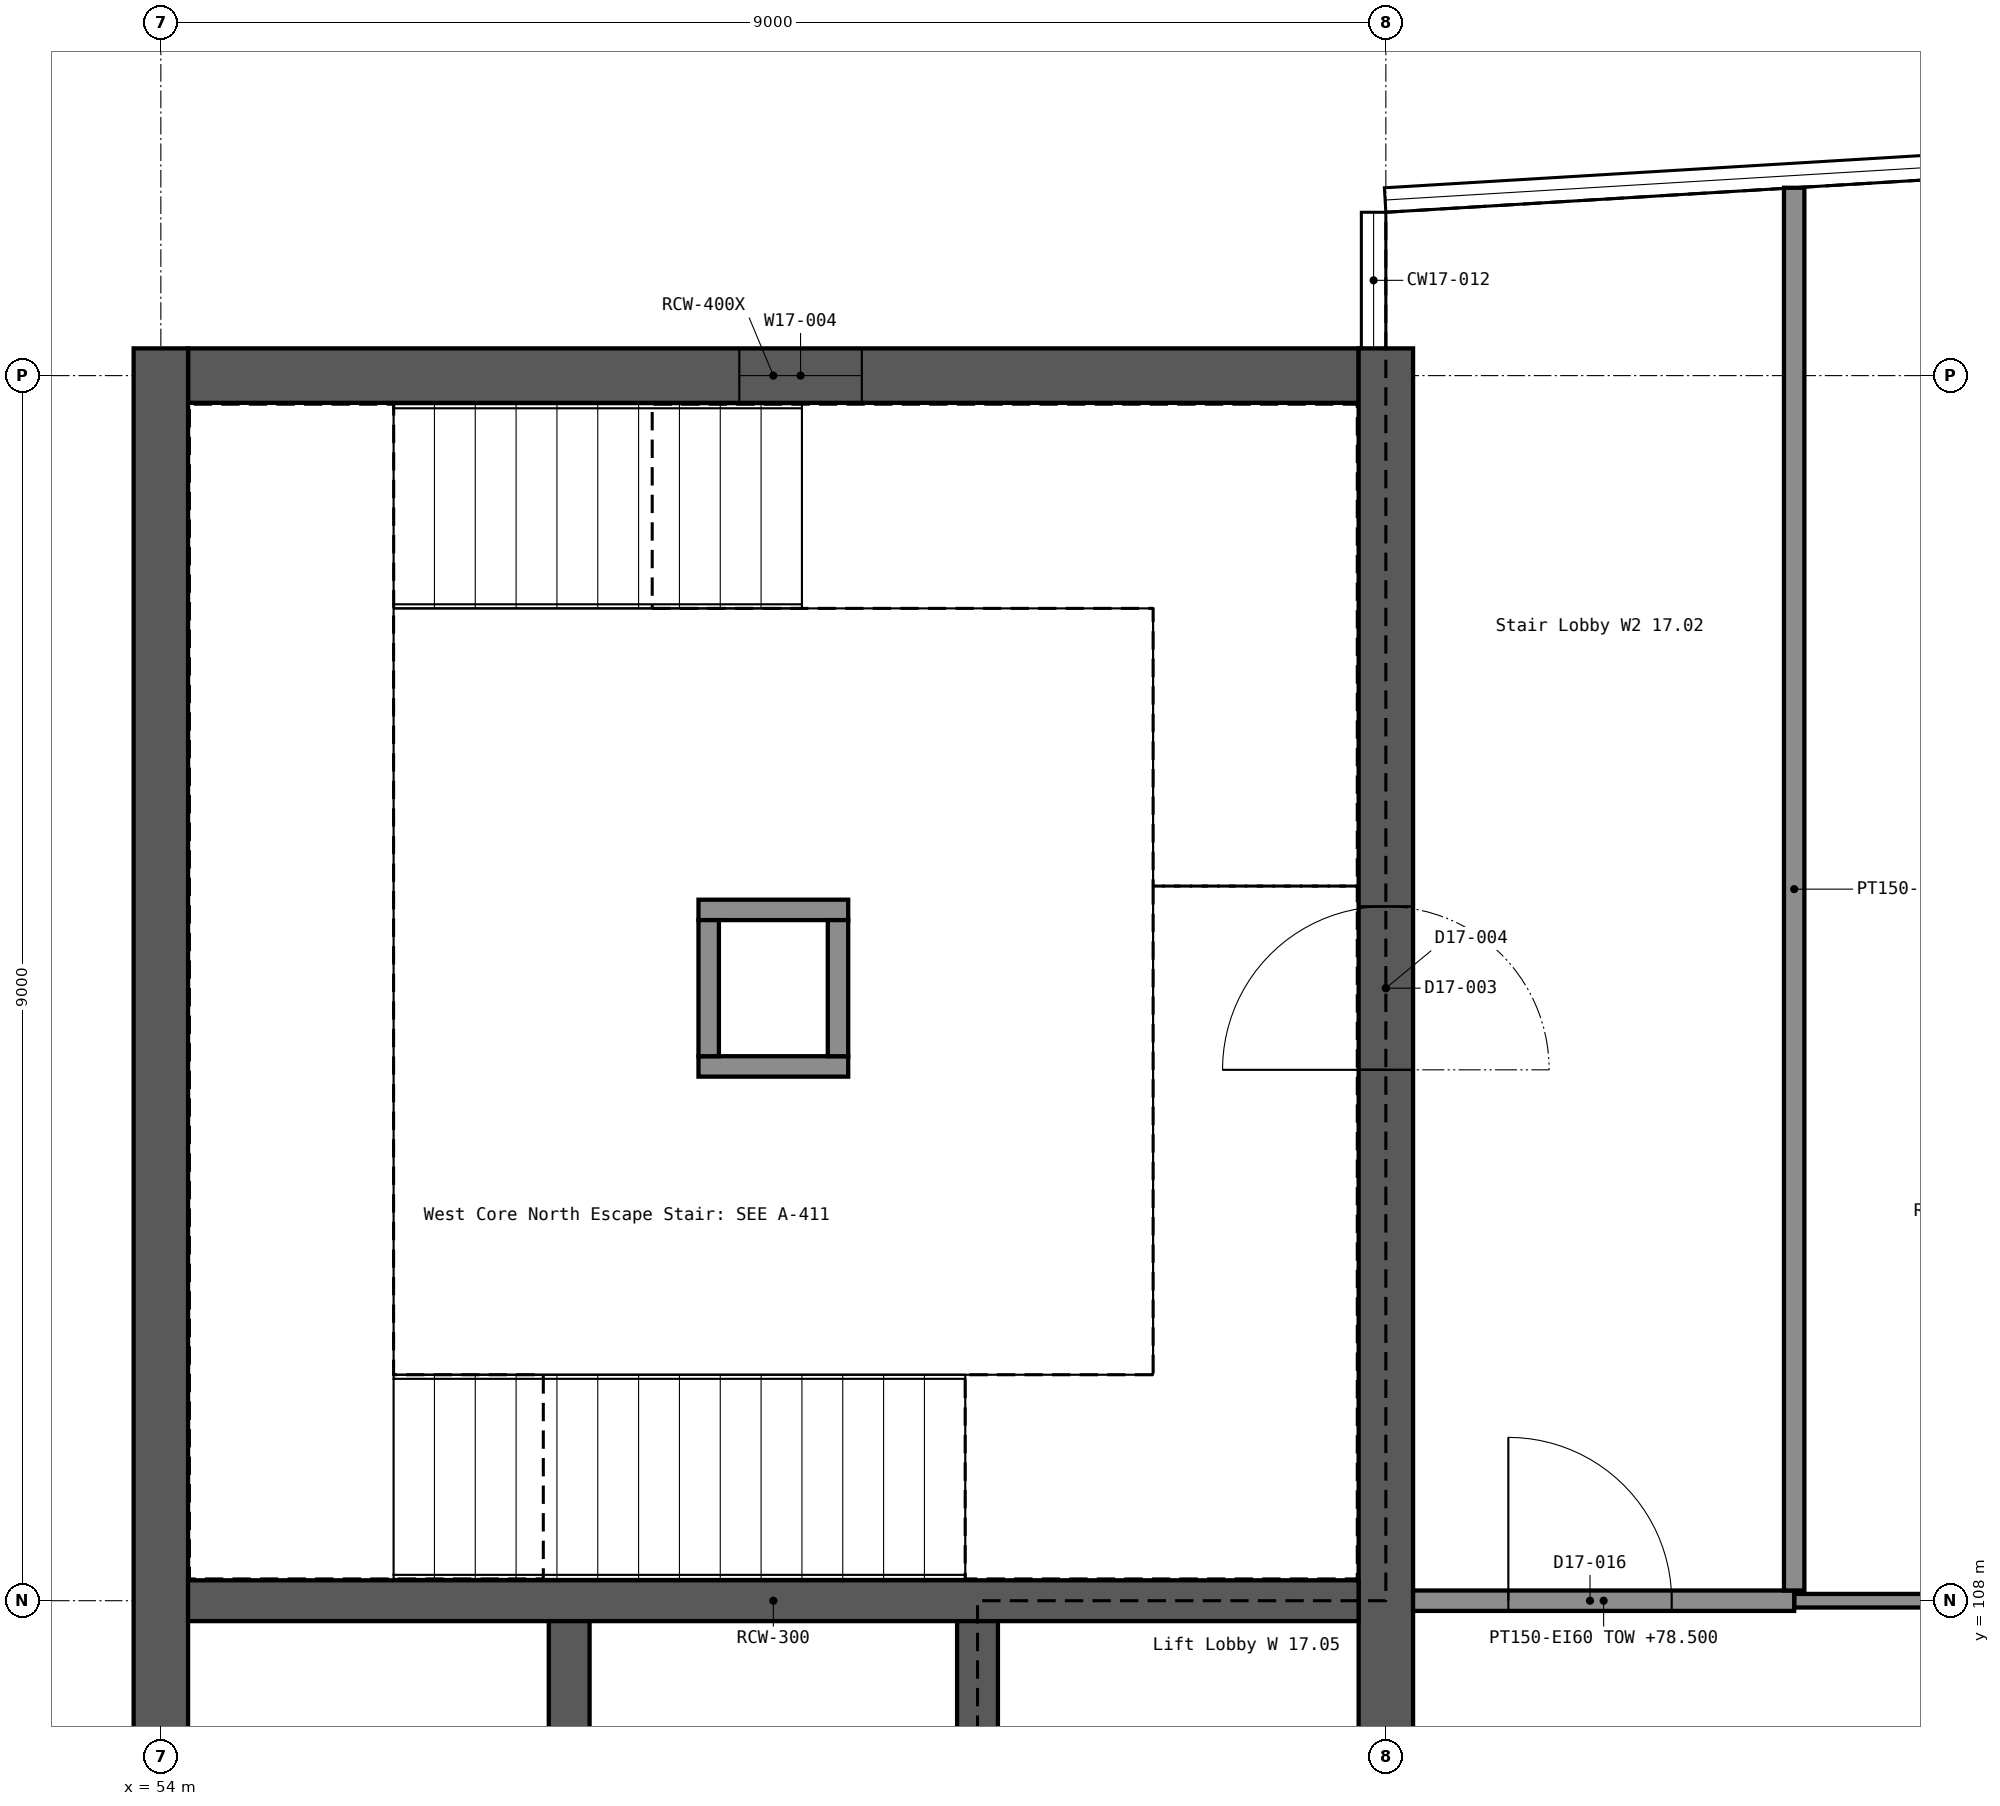
"""IFC4 building model, lengths in metres.
Left out: names, types, materials, properties, quantities, classifications, styles, units other than length and angle.
Written with IfcOpenShell. Run it as: python <this file> out.ifc"""

import sys

from ifc_helpers import new_model, si_unit, direction, frame, frame_2d, origin, origin_2d, place, context, subcontext, project, spatial, rectangle, extrude, element, fill, save


model = new_model("IFC4")
c1 = context("Model", 3, precision=1e-05, world=origin(), true_north=direction((0.0, 1.0)))
c2 = subcontext(c1, "Body", "Model", "MODEL_VIEW")
j1 = project(units=[si_unit("LENGTHUNIT", "METRE"), si_unit("PLANEANGLEUNIT", "RADIAN")], contexts=[c1])
p1 = place(None, origin())
s1 = spatial("IfcSite", under=j1, at=p1, CompositionType="ELEMENT")
p2 = place(p1, origin())
s2 = spatial("IfcBuilding", under=s1, at=p2, CompositionType="ELEMENT")
p3 = place(p2, frame((0.0, 0.0, 75.3)))
s3 = spatial("IfcBuildingStorey", under=s2, at=p3, CompositionType="ELEMENT", Elevation=75.3)
p4 = place(p3, frame((54.2, 117.0, 0.0), z_axis=(0.0, 0.0, 1.0), x_axis=(1.0, 0.0, 0.0)))
e1 = element("IfcWall", 1, at=p4, inside=s3, PredefinedType="SHEAR", context=c2, shape_type="SweptSolid", body=[
    extrude(rectangle(XDim=8.6, YDim=0.4, at=frame_2d((4.3, 0.0))), origin(), (0.0, 0.0, 1.0), 7.5),
])
p5 = place(p4, frame((4.05, 0.0, 1.2)))
e2 = element("IfcOpeningElement", 2, at=p5, cuts=e1, PredefinedType="OPENING", context=c2, shape_type="SweptSolid", body=[
    extrude(rectangle(XDim=0.9, YDim=1.5, at=frame_2d((0.45, 0.75))), frame((0.0, 0.211, 0.0), z_axis=(0.0, -1.0, 0.0), x_axis=(1.0, 0.0, 0.0)), (0.0, 0.0, 1.0), 0.422),
])
p6 = place(p3, frame((54.0, 89.8, 0.0), z_axis=(0.0, 0.0, 1.0), x_axis=(0.0, 1.0, 0.0)))
e3 = element("IfcWall", 3, at=p6, inside=s3, PredefinedType="SHEAR", context=c2, shape_type="SweptSolid", body=[
    extrude(rectangle(XDim=27.4, YDim=0.4, at=frame_2d((13.7, 0.0))), origin(), (0.0, 0.0, 1.0), 7.5),
])
p7 = place(p3, frame((63.0, 89.8, 0.0), z_axis=(0.0, 0.0, 1.0), x_axis=(0.0, 1.0, 0.0)))
e4 = element("IfcWall", 4, at=p7, inside=s3, PredefinedType="SHEAR", context=c2, shape_type="SweptSolid", body=[
    extrude(rectangle(XDim=27.4, YDim=0.4, at=frame_2d((13.7, 0.0))), origin(), (0.0, 0.0, 1.0), 7.5),
])
p8 = place(p7, frame((4.1, 0.0, 0.0)))
e5 = element("IfcOpeningElement", 5, at=p8, cuts=e4, PredefinedType="OPENING", context=c2, shape_type="SweptSolid", body=[
    extrude(rectangle(XDim=1.2, YDim=2.1, at=frame_2d((0.6, 1.05))), frame((0.0, 0.211, 0.0), z_axis=(0.0, -1.0, 0.0), x_axis=(1.0, 0.0, 0.0)), (0.0, 0.0, 1.0), 0.422),
])
p9 = place(p7, frame((4.1, 0.0, 3.9)))
e6 = element("IfcOpeningElement", 6, at=p9, cuts=e4, PredefinedType="OPENING", context=c2, shape_type="SweptSolid", body=[
    extrude(rectangle(XDim=1.2, YDim=2.1, at=frame_2d((0.6, 1.05))), frame((0.0, 0.211, 0.0), z_axis=(0.0, -1.0, 0.0), x_axis=(1.0, 0.0, 0.0)), (0.0, 0.0, 1.0), 0.422),
])
p10 = place(p7, frame((22.1, 0.0, 0.0)))
e7 = element("IfcOpeningElement", 7, at=p10, cuts=e4, PredefinedType="OPENING", context=c2, shape_type="SweptSolid", body=[
    extrude(rectangle(XDim=1.2, YDim=2.1, at=frame_2d((0.6, 1.05))), frame((0.0, 0.211, 0.0), z_axis=(0.0, -1.0, 0.0), x_axis=(1.0, 0.0, 0.0)), (0.0, 0.0, 1.0), 0.422),
])
p11 = place(p7, frame((22.1, 0.0, 3.9)))
e8 = element("IfcOpeningElement", 8, at=p11, cuts=e4, PredefinedType="OPENING", context=c2, shape_type="SweptSolid", body=[
    extrude(rectangle(XDim=1.2, YDim=2.1, at=frame_2d((0.6, 1.05))), frame((0.0, 0.211, 0.0), z_axis=(0.0, -1.0, 0.0), x_axis=(1.0, 0.0, 0.0)), (0.0, 0.0, 1.0), 0.422),
])
p12 = place(p7, frame((12.5, 0.0, 0.0)))
e9 = element("IfcOpeningElement", 9, at=p12, cuts=e4, PredefinedType="OPENING", context=c2, shape_type="SweptSolid", body=[
    extrude(rectangle(XDim=2.0, YDim=2.1, at=frame_2d((1.0, 1.05))), frame((0.0, 0.211, 0.0), z_axis=(0.0, -1.0, 0.0), x_axis=(1.0, 0.0, 0.0)), (0.0, 0.0, 1.0), 0.422),
])
p13 = place(p3, frame((54.2, 108.0, 0.0), z_axis=(0.0, 0.0, 1.0), x_axis=(1.0, 0.0, 0.0)))
e10 = element("IfcWall", 10, at=p13, inside=s3, PredefinedType="SHEAR", context=c2, shape_type="SweptSolid", body=[
    extrude(rectangle(XDim=8.6, YDim=0.3, at=frame_2d((4.3, 0.0))), origin(), (0.0, 0.0, 1.0), 7.5),
])
p14 = place(p3, frame((57.0, 99.15, 0.0), z_axis=(0.0, 0.0, 1.0), x_axis=(0.0, 1.0, 0.0)))
e11 = element("IfcWall", 11, at=p14, inside=s3, PredefinedType="SHEAR", context=c2, shape_type="SweptSolid", body=[
    extrude(rectangle(XDim=8.7, YDim=0.3, at=frame_2d((4.35, 0.0))), origin(), (0.0, 0.0, 1.0), 7.5),
])
p15 = place(p3, frame((60.0, 99.15, 0.0), z_axis=(0.0, 0.0, 1.0), x_axis=(0.0, 1.0, 0.0)))
e12 = element("IfcWall", 12, at=p15, inside=s3, PredefinedType="SHEAR", context=c2, shape_type="SweptSolid", body=[
    extrude(rectangle(XDim=8.7, YDim=0.3, at=frame_2d((4.35, 0.0))), origin(), (0.0, 0.0, 1.0), 7.5),
])
p16 = place(p15, frame((0.8, 0.0, 0.0)))
e13 = element("IfcOpeningElement", 13, at=p16, cuts=e12, PredefinedType="OPENING", context=c2, shape_type="SweptSolid", body=[
    extrude(rectangle(XDim=1.1, YDim=2.1, at=frame_2d((0.55, 1.05))), frame((0.0, 0.161, 0.0), z_axis=(0.0, -1.0, 0.0), x_axis=(1.0, 0.0, 0.0)), (0.0, 0.0, 1.0), 0.322),
])
p17 = place(p15, frame((3.8, 0.0, 0.0)))
e14 = element("IfcOpeningElement", 14, at=p17, cuts=e12, PredefinedType="OPENING", context=c2, shape_type="SweptSolid", body=[
    extrude(rectangle(XDim=1.1, YDim=2.1, at=frame_2d((0.55, 1.05))), frame((0.0, 0.161, 0.0), z_axis=(0.0, -1.0, 0.0), x_axis=(1.0, 0.0, 0.0)), (0.0, 0.0, 1.0), 0.322),
])
p18 = place(p15, frame((6.8, 0.0, 0.0)))
e15 = element("IfcOpeningElement", 15, at=p18, cuts=e12, PredefinedType="OPENING", context=c2, shape_type="SweptSolid", body=[
    extrude(rectangle(XDim=1.1, YDim=2.1, at=frame_2d((0.55, 1.05))), frame((0.0, 0.161, 0.0), z_axis=(0.0, -1.0, 0.0), x_axis=(1.0, 0.0, 0.0)), (0.0, 0.0, 1.0), 0.322),
])
p19 = place(p3, frame((68.997, 118.435, 3.9), z_axis=(0.0, 0.0, 1.0), x_axis=(-0.998203971819, -0.059906849736, 0.0)))
e16 = element("IfcWall", 16, at=p19, inside=s3, PredefinedType="PARAPET", context=c2, shape_type="SweptSolid", body=[
    extrude(rectangle(XDim=3.008, YDim=0.25, at=frame_2d((1.504, 0.0))), origin(), (0.0, 0.0, 1.0), 3.1),
])
p20 = place(p3, frame((65.995, 118.254, 3.9), z_axis=(0.0, 0.0, 1.0), x_axis=(-0.998208822746, -0.059825965875, 0.0)))
e17 = element("IfcWall", 17, at=p20, inside=s3, PredefinedType="PARAPET", context=c2, shape_type="SweptSolid", body=[
    extrude(rectangle(XDim=3.008, YDim=0.25, at=frame_2d((1.504, 0.0))), origin(), (0.0, 0.0, 1.0), 2.6),
])
p21 = place(p3, frame((63.125, 117.957, 3.9), z_axis=(0.0, 0.0, 1.0), x_axis=(0.0, -1.0, 0.0)))
e18 = element("IfcWall", 18, at=p21, inside=s3, PredefinedType="PARAPET", context=c2, shape_type="SweptSolid", body=[
    extrude(rectangle(XDim=0.757, YDim=0.25, at=frame_2d((0.379, 0.0))), origin(), (0.0, 0.0, 1.0), 1.1),
])
p22 = place(p3, frame((54.0, 89.85, 7.5), z_axis=(0.0, 0.0, 1.0), x_axis=(0.0, 1.0, 0.0)))
e19 = element("IfcWall", 19, at=p22, inside=s3, PredefinedType="PARAPET", context=c2, shape_type="SweptSolid", body=[
    extrude(rectangle(XDim=27.3, YDim=0.3, at=frame_2d((13.65, 0.0))), origin(), (0.0, 0.0, 1.0), 1.1),
])
p23 = place(p3, frame((63.0, 100.1, 7.5), z_axis=(0.0, 0.0, 1.0), x_axis=(0.0, 1.0, 0.0)))
e20 = element("IfcWall", 20, at=p23, inside=s3, PredefinedType="PARAPET", context=c2, shape_type="SweptSolid", body=[
    extrude(rectangle(XDim=17.05, YDim=0.3, at=frame_2d((8.525, 0.0))), origin(), (0.0, 0.0, 1.0), 1.1),
])
p24 = place(p3, frame((54.15, 117.0, 7.5), z_axis=(0.0, 0.0, 1.0), x_axis=(1.0, 0.0, 0.0)))
e21 = element("IfcWall", 21, at=p24, inside=s3, PredefinedType="PARAPET", context=c2, shape_type="SweptSolid", body=[
    extrude(rectangle(XDim=8.7, YDim=0.3, at=frame_2d((4.35, 0.0))), origin(), (0.0, 0.0, 1.0), 1.1),
])
for number, where, z_axis, x_axis in (
    (22, (57.95, 111.925, 7.5), (0.0, 0.0, 1.0), (1.0, 0.0, 0.0)),
    (23, (57.95, 113.075, 7.5), (0.0, 0.0, 1.0), (1.0, 0.0, 0.0)),
):
    element("IfcWall", number, at=place(p3, frame(where, z_axis=z_axis, x_axis=x_axis)), inside=s3, PredefinedType="SOLIDWALL", context=c2, shape_type="SweptSolid", body=[
        extrude(rectangle(XDim=1.1, YDim=0.15, at=frame_2d((0.55, 0.0))), origin(), (0.0, 0.0, 1.0), 0.15),
    ])
for number, where, z_axis, x_axis in (
    (24, (58.025, 112.0, 7.5), (0.0, 0.0, 1.0), (0.0, 1.0, 0.0)),
    (25, (58.975, 112.0, 7.5), (0.0, 0.0, 1.0), (0.0, 1.0, 0.0)),
):
    element("IfcWall", number, at=place(p3, frame(where, z_axis=z_axis, x_axis=x_axis)), inside=s3, PredefinedType="SOLIDWALL", context=c2, shape_type="SweptSolid", body=[
        extrude(rectangle(XDim=1.0, YDim=0.15, at=frame_2d((0.5, 0.0))), origin(), (0.0, 0.0, 1.0), 0.15),
    ])
p25 = place(p3, frame((66.0, 108.0, 0.0), z_axis=(0.0, 0.0, 1.0), x_axis=(1.0, 0.0, 0.0)))
e26 = element("IfcWall", 26, at=p25, inside=s3, PredefinedType="PARTITIONING", context=c2, shape_type="SweptSolid", body=[
    extrude(rectangle(XDim=5.87, YDim=0.1, at=frame_2d((2.935, 0.0))), origin(), (0.0, 0.0, 1.0), 3.2),
])
p26 = place(p25, frame((1.05, 0.0, 0.0)))
e27 = element("IfcOpeningElement", 27, at=p26, cuts=e26, PredefinedType="OPENING", context=c2, shape_type="SweptSolid", body=[
    extrude(rectangle(XDim=0.9, YDim=2.1, at=frame_2d((0.45, 1.05))), frame((0.0, 0.061, 0.0), z_axis=(0.0, -1.0, 0.0), x_axis=(1.0, 0.0, 0.0)), (0.0, 0.0, 1.0), 0.122),
])
p27 = place(p25, frame((4.1, 0.0, 0.0)))
e28 = element("IfcOpeningElement", 28, at=p27, cuts=e26, PredefinedType="OPENING", context=c2, shape_type="SweptSolid", body=[
    extrude(rectangle(XDim=0.8, YDim=2.1, at=frame_2d((0.4, 1.05))), frame((0.0, 0.061, 0.0), z_axis=(0.0, -1.0, 0.0), x_axis=(1.0, 0.0, 0.0)), (0.0, 0.0, 1.0), 0.122),
])
p28 = place(p3, frame((63.2, 108.0, 0.0), z_axis=(0.0, 0.0, 1.0), x_axis=(1.0, 0.0, 0.0)))
e29 = element("IfcWall", 29, at=p28, inside=s3, PredefinedType="PARTITIONING", context=c2, shape_type="SweptSolid", body=[
    extrude(rectangle(XDim=2.8, YDim=0.15, at=frame_2d((1.4, 0.0))), origin(), (0.0, 0.0, 1.0), 3.2),
])
p29 = place(p28, frame((0.7, 0.0, 0.0)))
e30 = element("IfcOpeningElement", 30, at=p29, cuts=e29, PredefinedType="OPENING", context=c2, shape_type="SweptSolid", body=[
    extrude(rectangle(XDim=1.2, YDim=2.1, at=frame_2d((0.6, 1.05))), frame((0.0, 0.086, 0.0), z_axis=(0.0, -1.0, 0.0), x_axis=(1.0, 0.0, 0.0)), (0.0, 0.0, 1.0), 0.172),
])
p30 = place(p3, frame((66.0, 108.075, 0.0), z_axis=(0.0, 0.0, 1.0), x_axis=(0.0, 1.0, 0.0)))
e31 = element("IfcWall", 31, at=p30, inside=s3, PredefinedType="PARTITIONING", context=c2, shape_type="SweptSolid", body=[
    extrude(rectangle(XDim=10.305, YDim=0.15, at=frame_2d((5.152, 0.0))), origin(), (0.0, 0.0, 1.0), 3.25),
])
p31 = place(p5, origin())
e32 = element("IfcWindow", 32, at=p31, inside=s3, PartitioningType="SINGLE_PANEL", PredefinedType="WINDOW", context=c2, shape_type="SweptSolid", body=[
    extrude(rectangle(XDim=0.9, YDim=1.5, at=frame_2d((0.45, 0.75))), frame((0.0, 0.03, 0.0), z_axis=(0.0, -1.0, 0.0), x_axis=(1.0, 0.0, 0.0)), (0.0, 0.0, 1.0), 0.06),
])
fill(e2, e32)
p32 = place(p2, frame((0.0, 0.0, 82.5)))
p33 = place(p32, origin())
p34 = place(p33, frame((58.5, 112.5, 0.0)))
p35 = place(p34, frame((0.0, 0.0, 0.25)))
e33 = element("IfcWindow", 33, at=p35, inside=s3, PartitioningType="SINGLE_PANEL", PredefinedType="SKYLIGHT", context=c2, shape_type="SweptSolid", body=[
    extrude(rectangle(XDim=0.8, YDim=1.0, at=origin_2d()), origin(), (0.0, 0.0, 1.0), 0.05),
])
p36 = place(p10, origin())
e34 = element("IfcDoor", 34, at=p36, inside=s3, OperationType="SINGLE_SWING_LEFT", PredefinedType="DOOR", context=c2, shape_type="SweptSolid", body=[
    extrude(rectangle(XDim=1.2, YDim=2.1, at=frame_2d((0.6, 1.05))), frame((0.0, 0.025, 0.0), z_axis=(0.0, -1.0, 0.0), x_axis=(1.0, 0.0, 0.0)), (0.0, 0.0, 1.0), 0.05),
])
fill(e7, e34)
p37 = place(p11, frame((1.2, 0.0, 0.0), z_axis=(0.0, 0.0, 1.0), x_axis=(-1.0, 0.0, 0.0)))
e35 = element("IfcDoor", 35, at=p37, inside=s3, OperationType="SINGLE_SWING_RIGHT", PredefinedType="DOOR", context=c2, shape_type="SweptSolid", body=[
    extrude(rectangle(XDim=1.2, YDim=2.1, at=frame_2d((0.6, 1.05))), frame((0.0, 0.025, 0.0), z_axis=(0.0, -1.0, 0.0), x_axis=(1.0, 0.0, 0.0)), (0.0, 0.0, 1.0), 0.05),
])
fill(e8, e35)
p38 = place(p29, origin())
e36 = element("IfcDoor", 36, at=p38, inside=s3, OperationType="SINGLE_SWING_LEFT", PredefinedType="DOOR", context=c2, shape_type="SweptSolid", body=[
    extrude(rectangle(XDim=1.2, YDim=2.1, at=frame_2d((0.6, 1.05))), frame((0.0, 0.025, 0.0), z_axis=(0.0, -1.0, 0.0), x_axis=(1.0, 0.0, 0.0)), (0.0, 0.0, 1.0), 0.05),
])
fill(e30, e36)
save(model, sys.argv[1])
